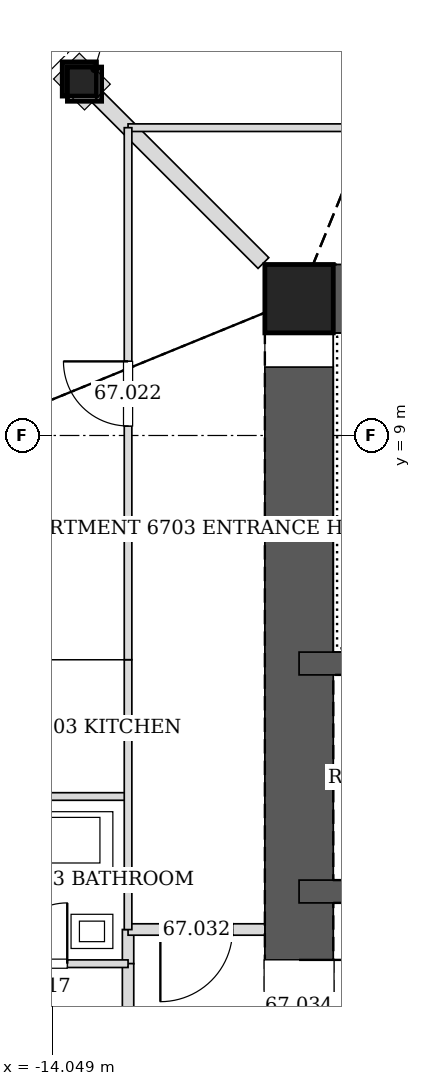
"""IFC4 building model, lengths in metres.
Left out: names, types, materials, properties, quantities, classifications, styles, units other than length and angle.
Written with IfcOpenShell. Run it as: python <this file> out.ifc"""

import sys

from ifc_helpers import new_model, si_unit, direction, frame, frame_2d, origin, origin_2d, place, context, subcontext, project, spatial, rectangle, hollow_rectangle, extrude, element, fill, save


model = new_model("IFC4")
c1 = context("Model", 3, precision=1e-05, world=origin(), true_north=direction((0.0, 1.0)))
c2 = subcontext(c1, "Body", "Model", "MODEL_VIEW")
j1 = project(units=[si_unit("LENGTHUNIT", "METRE"), si_unit("PLANEANGLEUNIT", "RADIAN")], contexts=[c1])
p1 = place(None, origin())
s1 = spatial("IfcSite", under=j1, at=p1, CompositionType="ELEMENT")
p2 = place(p1, origin())
s2 = spatial("IfcBuilding", under=s1, at=p2, CompositionType="ELEMENT")
p3 = place(p2, frame((0.0, 0.0, 277.6)))
s3 = spatial("IfcBuildingStorey", under=s2, at=p3, CompositionType="ELEMENT", Elevation=277.6)
p4 = place(p3, frame((-13.691, 13.691, 0.0), z_axis=(0.020026431307, -0.020026431307, 0.999598861593), x_axis=(0.707106781187, 0.707106781187, 0.0)))
e1 = element("IfcColumn", 1, at=p4, inside=s3, PredefinedType="COLUMN", context=c2, shape_type="SweptSolid", body=[
    extrude(hollow_rectangle(XDim=0.45, YDim=0.45, WallThickness=0.02, at=origin_2d()), origin(), (0.0, 0.0, 1.0), 3.401),
])
p5 = place(p3, frame((-10.8, 10.8, 0.0), z_axis=(0.0, 0.0, 1.0), x_axis=(1.0, 0.0, 0.0)))
e2 = element("IfcColumn", 2, at=p5, inside=s3, PredefinedType="COLUMN", context=c2, shape_type="SweptSolid", body=[
    extrude(hollow_rectangle(XDim=0.9, YDim=0.9, WallThickness=0.04, at=origin_2d()), origin(), (0.0, 0.0, 1.0), 3.4),
])
p6 = place(p3, frame((10.8, 10.8, 0.0), z_axis=(0.0, 0.0, 1.0), x_axis=(-1.0, 0.0, 0.0)))
e3 = element("IfcWall", 3, at=p6, inside=s3, PredefinedType="SOLIDWALL", context=c2, shape_type="SweptSolid", body=[
    extrude(rectangle(XDim=21.6, YDim=0.9, at=frame_2d((10.8, 0.0))), origin(), (0.0, 0.0, 1.0), 3.4),
])
p7 = place(p6, frame((10.05, 0.0, 0.0)))
e4 = element("IfcOpeningElement", 4, at=p7, cuts=e3, PredefinedType="OPENING", context=c2, shape_type="SweptSolid", body=[
    extrude(rectangle(XDim=1.5, YDim=2.1, at=frame_2d((0.75, 1.05))), frame((0.0, 0.46, 0.0), z_axis=(0.0, -1.0, 0.0), x_axis=(1.0, 0.0, 0.0)), (0.0, 0.0, 1.0), 0.92),
])
p8 = place(p3, frame((-10.8, 10.8, 0.0), z_axis=(0.0, 0.0, 1.0), x_axis=(0.0, -1.0, 0.0)))
e5 = element("IfcWall", 5, at=p8, inside=s3, PredefinedType="SOLIDWALL", context=c2, shape_type="SweptSolid", body=[
    extrude(rectangle(XDim=21.6, YDim=0.9, at=frame_2d((10.8, 0.0))), origin(), (0.0, 0.0, 1.0), 3.4),
])
p9 = place(p8, frame((8.7, 0.0, 0.0)))
e6 = element("IfcOpeningElement", 6, at=p9, cuts=e5, PredefinedType="OPENING", context=c2, shape_type="SweptSolid", body=[
    extrude(rectangle(XDim=1.2, YDim=2.1, at=frame_2d((0.6, 1.05))), frame((0.0, 0.46, 0.0), z_axis=(0.0, -1.0, 0.0), x_axis=(1.0, 0.0, 0.0)), (0.0, 0.0, 1.0), 0.92),
])
p10 = place(p8, frame((11.7, 0.0, 0.0)))
e7 = element("IfcOpeningElement", 7, at=p10, cuts=e5, PredefinedType="OPENING", context=c2, shape_type="SweptSolid", body=[
    extrude(rectangle(XDim=1.2, YDim=2.1, at=frame_2d((0.6, 1.05))), frame((0.0, 0.46, 0.0), z_axis=(0.0, -1.0, 0.0), x_axis=(1.0, 0.0, 0.0)), (0.0, 0.0, 1.0), 0.92),
])
p11 = place(p3, frame((-10.8, 3.0, 0.0), z_axis=(0.0, 0.0, 1.0), x_axis=(1.0, 0.0, 0.0)))
e8 = element("IfcWall", 8, at=p11, inside=s3, PredefinedType="SOLIDWALL", context=c2, shape_type="SweptSolid", body=[
    extrude(rectangle(XDim=21.6, YDim=0.3, at=frame_2d((10.8, 0.0))), origin(), (0.0, 0.0, 1.0), 3.4),
])
p12 = place(p11, frame((1.65, 0.0, 0.0)))
e9 = element("IfcOpeningElement", 9, at=p12, cuts=e8, PredefinedType="OPENING", context=c2, shape_type="SweptSolid", body=[
    extrude(rectangle(XDim=0.9, YDim=2.1, at=frame_2d((0.45, 1.05))), frame((0.0, 0.16, 0.0), z_axis=(0.0, -1.0, 0.0), x_axis=(1.0, 0.0, 0.0)), (0.0, 0.0, 1.0), 0.32),
])
p13 = place(p11, frame((7.45, 0.0, 0.0)))
e10 = element("IfcOpeningElement", 10, at=p13, cuts=e8, PredefinedType="OPENING", context=c2, shape_type="SweptSolid", body=[
    extrude(rectangle(XDim=0.9, YDim=2.1, at=frame_2d((0.45, 1.05))), frame((0.0, 0.16, 0.0), z_axis=(0.0, -1.0, 0.0), x_axis=(1.0, 0.0, 0.0)), (0.0, 0.0, 1.0), 0.32),
])
p14 = place(p11, frame((13.25, 0.0, 0.0)))
e11 = element("IfcOpeningElement", 11, at=p14, cuts=e8, PredefinedType="OPENING", context=c2, shape_type="SweptSolid", body=[
    extrude(rectangle(XDim=0.9, YDim=2.1, at=frame_2d((0.45, 1.05))), frame((0.0, 0.16, 0.0), z_axis=(0.0, -1.0, 0.0), x_axis=(1.0, 0.0, 0.0)), (0.0, 0.0, 1.0), 0.32),
])
p15 = place(p11, frame((16.15, 0.0, 0.0)))
e12 = element("IfcOpeningElement", 12, at=p15, cuts=e8, PredefinedType="OPENING", context=c2, shape_type="SweptSolid", body=[
    extrude(rectangle(XDim=0.9, YDim=2.1, at=frame_2d((0.45, 1.05))), frame((0.0, 0.16, 0.0), z_axis=(0.0, -1.0, 0.0), x_axis=(1.0, 0.0, 0.0)), (0.0, 0.0, 1.0), 0.32),
])
p16 = place(p11, frame((19.05, 0.0, 0.0)))
e13 = element("IfcOpeningElement", 13, at=p16, cuts=e8, PredefinedType="OPENING", context=c2, shape_type="SweptSolid", body=[
    extrude(rectangle(XDim=0.9, YDim=2.1, at=frame_2d((0.45, 1.05))), frame((0.0, 0.16, 0.0), z_axis=(0.0, -1.0, 0.0), x_axis=(1.0, 0.0, 0.0)), (0.0, 0.0, 1.0), 0.32),
])
p17 = place(p11, frame((4.55, 0.0, 0.0)))
e14 = element("IfcOpeningElement", 14, at=p17, cuts=e8, PredefinedType="OPENING", context=c2, shape_type="SweptSolid", body=[
    extrude(rectangle(XDim=0.9, YDim=2.1, at=frame_2d((0.45, 1.05))), frame((0.0, 0.16, 0.0), z_axis=(0.0, -1.0, 0.0), x_axis=(1.0, 0.0, 0.0)), (0.0, 0.0, 1.0), 0.32),
])
p18 = place(p3, frame((-10.8, 6.0, 0.0), z_axis=(0.0, 0.0, 1.0), x_axis=(1.0, 0.0, 0.0)))
e15 = element("IfcWall", 15, at=p18, inside=s3, PredefinedType="SOLIDWALL", context=c2, shape_type="SweptSolid", body=[
    extrude(rectangle(XDim=21.6, YDim=0.3, at=frame_2d((10.8, 0.0))), origin(), (0.0, 0.0, 1.0), 3.4),
])
p19 = place(p18, frame((10.25, 0.0, 0.0)))
e16 = element("IfcOpeningElement", 16, at=p19, cuts=e15, PredefinedType="OPENING", context=c2, shape_type="SweptSolid", body=[
    extrude(rectangle(XDim=1.1, YDim=2.1, at=frame_2d((0.55, 1.05))), frame((0.0, 0.16, 0.0), z_axis=(0.0, -1.0, 0.0), x_axis=(1.0, 0.0, 0.0)), (0.0, 0.0, 1.0), 0.32),
])
p20 = place(p3, frame((-13.05, 2.5, 0.0), z_axis=(0.0, 0.0, 1.0), x_axis=(0.0, -1.0, 0.0)))
e17 = element("IfcWall", 17, at=p20, inside=s3, PredefinedType="PARTITIONING", context=c2, shape_type="SweptSolid", body=[
    extrude(rectangle(XDim=0.451, YDim=0.15, at=frame_2d((0.226, 0.0))), origin(), (0.0, 0.0, 1.0), 3.2),
])
p21 = place(p3, frame((-13.05, 2.051, 0.0), z_axis=(0.0, 0.0, 1.0), x_axis=(0.0, -1.0, 0.0)))
e18 = element("IfcWall", 18, at=p21, inside=s3, PredefinedType="PARTITIONING", context=c2, shape_type="SweptSolid", body=[
    extrude(rectangle(XDim=9.602, YDim=0.15, at=frame_2d((4.801, 0.0))), origin(), (0.0, 0.0, 1.0), 2.344),
])
p22 = place(p3, frame((-11.25, 2.5, 0.0), z_axis=(0.0, 0.0, 1.0), x_axis=(-1.0, 0.0, 0.0)))
e19 = element("IfcWall", 19, at=p22, inside=s3, PredefinedType="PARTITIONING", context=c2, shape_type="SweptSolid", body=[
    extrude(rectangle(XDim=1.8, YDim=0.15, at=frame_2d((0.9, 0.0))), origin(), (0.0, 0.0, 1.0), 3.2),
])
p23 = place(p22, frame((0.425, 0.0, 0.0)))
e20 = element("IfcOpeningElement", 20, at=p23, cuts=e19, PredefinedType="OPENING", context=c2, shape_type="SweptSolid", body=[
    extrude(rectangle(XDim=0.95, YDim=2.1, at=frame_2d((0.475, 1.05))), frame((0.0, 0.085, 0.0), z_axis=(0.0, -1.0, 0.0), x_axis=(1.0, 0.0, 0.0)), (0.0, 0.0, 1.0), 0.17),
])
p24 = place(p3, frame((-13.45, 13.45, 0.0), z_axis=(0.0, 0.0, 1.0), x_axis=(0.707106781187, -0.707106781187, 0.0)))
e21 = element("IfcWall", 21, at=p24, inside=s3, PredefinedType="PARTITIONING", context=c2, shape_type="SweptSolid", body=[
    extrude(rectangle(XDim=3.085, YDim=0.2, at=frame_2d((1.542, 0.0))), origin(), (0.0, 0.0, 1.0), 2.591),
])
p25 = place(p3, frame((-13.05, 13.05, 0.0), z_axis=(0.0, 0.0, 1.0), x_axis=(1.0, 0.0, 0.0)))
e22 = element("IfcWall", 22, at=p25, inside=s3, PredefinedType="PARTITIONING", context=c2, shape_type="SweptSolid", body=[
    extrude(rectangle(XDim=7.0, YDim=0.1, at=frame_2d((3.5, 0.0))), origin(), (0.0, 0.0, 1.0), 2.428),
])
p26 = place(p25, frame((3.075, 0.0, 0.0)))
e23 = element("IfcOpeningElement", 23, at=p26, cuts=e22, PredefinedType="OPENING", context=c2, shape_type="SweptSolid", body=[
    extrude(rectangle(XDim=0.85, YDim=2.1, at=frame_2d((0.425, 1.05))), frame((0.0, 0.06, 0.0), z_axis=(0.0, -1.0, 0.0), x_axis=(1.0, 0.0, 0.0)), (0.0, 0.0, 1.0), 0.12),
])
p27 = place(p3, frame((-15.45, 4.25, 0.0), z_axis=(0.0, 0.0, 1.0), x_axis=(1.0, 0.0, 0.0)))
e24 = element("IfcWall", 24, at=p27, inside=s3, PredefinedType="PARTITIONING", context=c2, shape_type="SweptSolid", body=[
    extrude(rectangle(XDim=2.4, YDim=0.1, at=frame_2d((1.2, 0.0))), origin(), (0.0, 0.0, 1.0), 2.591),
])
p28 = place(p3, frame((-13.05, 6.05, 0.0), z_axis=(0.0, 0.0, 1.0), x_axis=(0.0, -1.0, 0.0)))
e25 = element("IfcWall", 25, at=p28, inside=s3, PredefinedType="PARTITIONING", context=c2, shape_type="SweptSolid", body=[
    extrude(rectangle(XDim=3.551, YDim=0.1, at=frame_2d((1.775, 0.0))), origin(), (0.0, 0.0, 1.0), 3.2),
])
p29 = place(p3, frame((-15.45, 2.05, 0.0), z_axis=(0.0, 0.0, 1.0), x_axis=(1.0, 0.0, 0.0)))
e26 = element("IfcWall", 26, at=p29, inside=s3, PredefinedType="PARTITIONING", context=c2, shape_type="SweptSolid", body=[
    extrude(rectangle(XDim=2.4, YDim=0.1, at=frame_2d((1.2, 0.0))), origin(), (0.0, 0.0, 1.0), 2.591),
])
p30 = place(p29, frame((0.8, 0.0, 0.0)))
e27 = element("IfcOpeningElement", 27, at=p30, cuts=e26, PredefinedType="OPENING", context=c2, shape_type="SweptSolid", body=[
    extrude(rectangle(XDim=0.8, YDim=2.1, at=frame_2d((0.4, 1.05))), frame((0.0, 0.06, 0.0), z_axis=(0.0, -1.0, 0.0), x_axis=(1.0, 0.0, 0.0)), (0.0, 0.0, 1.0), 0.12),
])
p31 = place(p3, frame((-13.05, 6.05, 0.0), z_axis=(0.0, 0.0, 1.0), x_axis=(0.0, 1.0, 0.0)))
e28 = element("IfcWall", 28, at=p31, inside=s3, PredefinedType="PARTITIONING", context=c2, shape_type="SweptSolid", body=[
    extrude(rectangle(XDim=7.0, YDim=0.1, at=frame_2d((3.5, 0.0))), origin(), (0.0, 0.0, 1.0), 2.428),
])
p32 = place(p31, frame((3.075, 0.0, 0.0)))
e29 = element("IfcOpeningElement", 29, at=p32, cuts=e28, PredefinedType="OPENING", context=c2, shape_type="SweptSolid", body=[
    extrude(rectangle(XDim=0.85, YDim=2.1, at=frame_2d((0.425, 1.05))), frame((0.0, 0.06, 0.0), z_axis=(0.0, -1.0, 0.0), x_axis=(1.0, 0.0, 0.0)), (0.0, 0.0, 1.0), 0.12),
])
p33 = place(p30, origin())
e30 = element("IfcDoor", 30, at=p33, inside=s3, OperationType="SINGLE_SWING_RIGHT", PredefinedType="DOOR", context=c2, shape_type="SweptSolid", body=[
    extrude(rectangle(XDim=0.8, YDim=2.1, at=frame_2d((0.4, 1.05))), frame((0.0, 0.025, 0.0), z_axis=(0.0, -1.0, 0.0), x_axis=(1.0, 0.0, 0.0)), (0.0, 0.0, 1.0), 0.05),
])
fill(e27, e30)
p34 = place(p32, origin())
e31 = element("IfcDoor", 31, at=p34, inside=s3, OperationType="SINGLE_SWING_RIGHT", PredefinedType="DOOR", context=c2, shape_type="SweptSolid", body=[
    extrude(rectangle(XDim=0.85, YDim=2.1, at=frame_2d((0.425, 1.05))), frame((0.0, 0.025, 0.0), z_axis=(0.0, -1.0, 0.0), x_axis=(1.0, 0.0, 0.0)), (0.0, 0.0, 1.0), 0.05),
])
fill(e29, e31)
p35 = place(p23, origin())
e32 = element("IfcDoor", 32, at=p35, inside=s3, OperationType="SINGLE_SWING_RIGHT", PredefinedType="DOOR", context=c2, shape_type="SweptSolid", body=[
    extrude(rectangle(XDim=0.95, YDim=2.1, at=frame_2d((0.475, 1.05))), frame((0.0, 0.025, 0.0), z_axis=(0.0, -1.0, 0.0), x_axis=(1.0, 0.0, 0.0)), (0.0, 0.0, 1.0), 0.05),
])
fill(e20, e32)
p36 = place(p9, origin())
e33 = element("IfcDoor", 33, at=p36, inside=s3, OperationType="SINGLE_SWING_LEFT", PredefinedType="DOOR", context=c2, shape_type="SweptSolid", body=[
    extrude(rectangle(XDim=1.2, YDim=2.1, at=frame_2d((0.6, 1.05))), frame((0.0, 0.025, 0.0), z_axis=(0.0, -1.0, 0.0), x_axis=(1.0, 0.0, 0.0)), (0.0, 0.0, 1.0), 0.05),
])
fill(e6, e33)
save(model, sys.argv[1])
